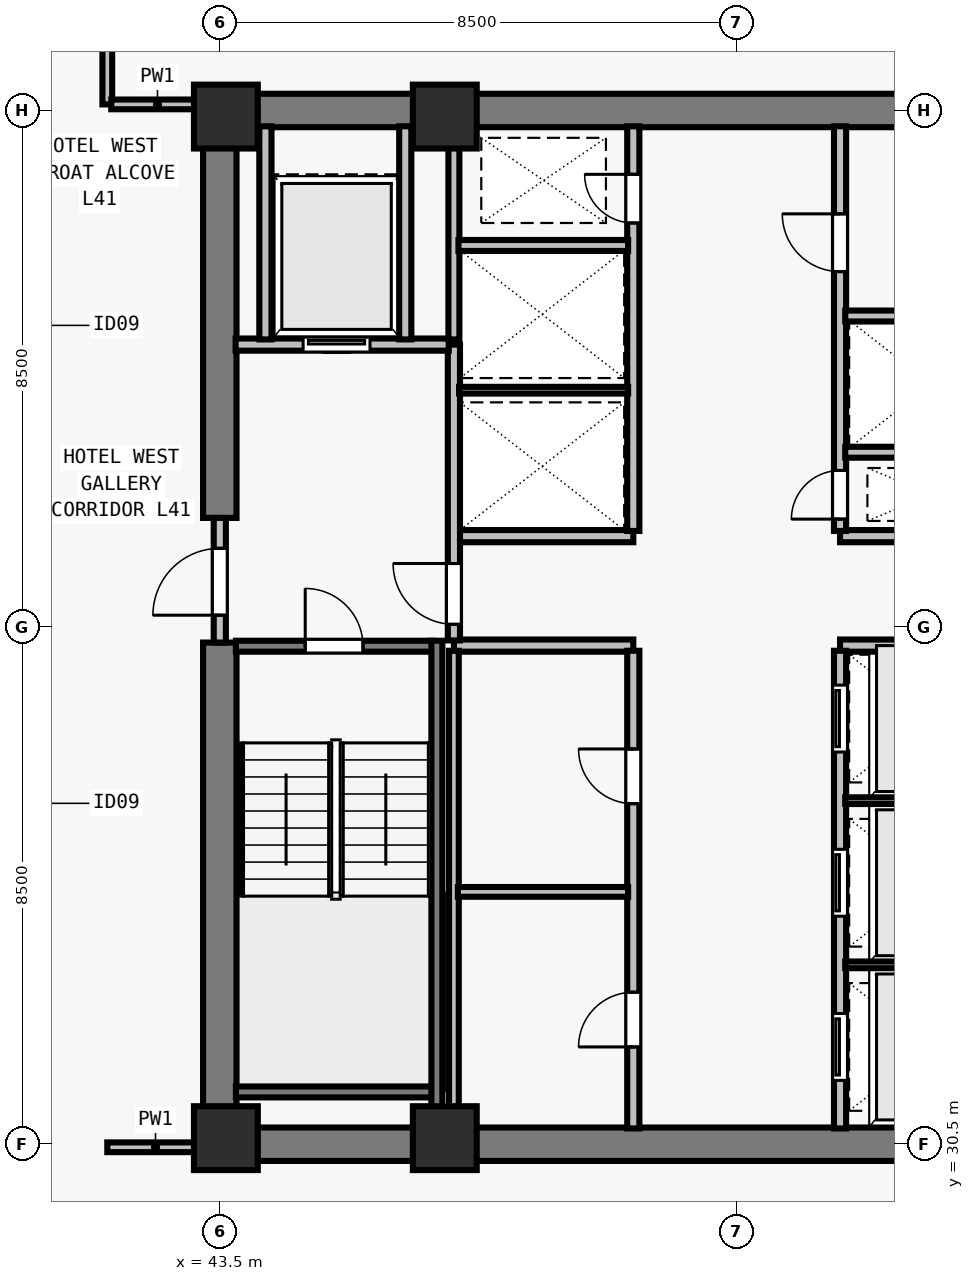
"""IFC4 building model, lengths in metres.
Left out: names, types, materials, properties, quantities, classifications, styles, units other than length and angle.
Written with IfcOpenShell. Run it as: python <this file> out.ifc"""

import sys

from ifc_helpers import new_model, si_unit, direction, frame, frame_2d, origin, origin_2d, place, context, subcontext, project, spatial, rectangle, extrude, element, fill, save


model = new_model("IFC4")
c1 = context("Model", 3, precision=1e-05, world=origin(), true_north=direction((0.0, 1.0)))
c2 = subcontext(c1, "Body", "Model", "MODEL_VIEW")
j1 = project(units=[si_unit("LENGTHUNIT", "METRE"), si_unit("PLANEANGLEUNIT", "RADIAN")], contexts=[c1])
p1 = place(None, origin())
s1 = spatial("IfcSite", under=j1, at=p1, CompositionType="ELEMENT")
p2 = place(p1, origin())
s2 = spatial("IfcBuilding", under=s1, at=p2, CompositionType="ELEMENT")
p3 = place(p2, frame((0.0, 0.0, 151.5)))
s3 = spatial("IfcBuildingStorey", under=s2, at=p3, CompositionType="ELEMENT", Elevation=151.5)
for number, where, z_axis, x_axis in (
    (1, (43.6, 30.6, 0.0), (0.0, 0.0, 1.0), (1.0, 0.0, 0.0)),
    (2, (47.2, 30.6, 0.0), (0.0, 0.0, 1.0), (1.0, 0.0, 0.0)),
    (3, (43.6, 47.4, 0.0), (0.0, 0.0, 1.0), (1.0, 0.0, 0.0)),
    (4, (47.2, 47.4, 0.0), (0.0, 0.0, 1.0), (1.0, 0.0, 0.0)),
):
    element("IfcColumn", number, at=place(p3, frame(where, z_axis=z_axis, x_axis=x_axis)), inside=s3, PredefinedType="COLUMN", context=c2, shape_type="SweptSolid", body=[
        extrude(rectangle(XDim=1.05, YDim=1.05, at=origin_2d()), origin(), (0.0, 0.0, 1.0), 3.5),
    ])
for number, where, z_axis, x_axis in (
    (5, (43.225, 30.5, 0.0), (0.0, 0.0, 1.0), (1.0, 0.0, 0.0)),
    (6, (43.225, 47.5, 0.0), (0.0, 0.0, 1.0), (1.0, 0.0, 0.0)),
):
    element("IfcWall", number, at=place(p3, frame(where, z_axis=z_axis, x_axis=x_axis)), inside=s3, PredefinedType="SHEAR", context=c2, shape_type="SweptSolid", body=[
        extrude(rectangle(XDim=17.55, YDim=0.55, at=frame_2d((8.775, 0.0))), origin(), (0.0, 0.0, 1.0), 3.28),
    ])
p4 = place(p3, frame((43.5, 30.765, 0.0), z_axis=(0.0, 0.0, 1.0), x_axis=(0.0, 1.0, 0.0)))
e7 = element("IfcWall", 7, at=p4, inside=s3, PredefinedType="SHEAR", context=c2, shape_type="SweptSolid", body=[
    extrude(rectangle(XDim=7.985, YDim=0.55, at=frame_2d((3.993, 0.0))), origin(), (0.0, 0.0, 1.0), 3.28),
])
p5 = place(p3, frame((43.5, 40.8, 0.0), z_axis=(0.0, 0.0, 1.0), x_axis=(0.0, 1.0, 0.0)))
e8 = element("IfcWall", 8, at=p5, inside=s3, PredefinedType="SHEAR", context=c2, shape_type="SweptSolid", body=[
    extrude(rectangle(XDim=6.435, YDim=0.55, at=frame_2d((3.218, 0.0))), origin(), (0.0, 0.0, 1.0), 3.28),
])
for number, where, z_axis, x_axis in (
    (9, (47.35, 38.7, 0.0), (0.0, 0.0, 1.0), (1.0, 0.0, 0.0)),
    (10, (47.35, 40.5, 0.0), (0.0, 0.0, 1.0), (1.0, 0.0, 0.0)),
    (11, (53.7, 38.7, 0.0), (0.0, 0.0, 1.0), (1.0, 0.0, 0.0)),
    (12, (53.7, 40.5, 0.0), (0.0, 0.0, 1.0), (1.0, 0.0, 0.0)),
):
    element("IfcWall", number, at=place(p3, frame(where, z_axis=z_axis, x_axis=x_axis)), inside=s3, PredefinedType="SOLIDWALL", context=c2, shape_type="SweptSolid", body=[
        extrude(rectangle(XDim=2.95, YDim=0.2, at=frame_2d((1.475, 0.0))), origin(), (0.0, 0.0, 1.0), 3.28),
    ])
p6 = place(p3, frame((50.3, 30.76, 0.0), z_axis=(0.0, 0.0, 1.0), x_axis=(0.0, 1.0, 0.0)))
e13 = element("IfcWall", 13, at=p6, inside=s3, PredefinedType="SOLIDWALL", context=c2, shape_type="SweptSolid", body=[
    extrude(rectangle(XDim=7.855, YDim=0.2, at=frame_2d((3.927, 0.0))), origin(), (0.0, 0.0, 1.0), 3.28),
])
p7 = place(p6, frame((1.34, 0.0, 0.0)))
e14 = element("IfcOpeningElement", 14, at=p7, cuts=e13, PredefinedType="OPENING", context=c2, shape_type="SweptSolid", body=[
    extrude(rectangle(XDim=0.9, YDim=2.12, at=frame_2d((0.45, 1.06))), frame((0.0, 0.11, 0.0), z_axis=(0.0, -1.0, 0.0), x_axis=(1.0, 0.0, 0.0)), (0.0, 0.0, 1.0), 0.22),
])
p8 = place(p6, frame((5.34, 0.0, 0.0)))
e15 = element("IfcOpeningElement", 15, at=p8, cuts=e13, PredefinedType="OPENING", context=c2, shape_type="SweptSolid", body=[
    extrude(rectangle(XDim=0.9, YDim=2.12, at=frame_2d((0.45, 1.06))), frame((0.0, 0.11, 0.0), z_axis=(0.0, -1.0, 0.0), x_axis=(1.0, 0.0, 0.0)), (0.0, 0.0, 1.0), 0.22),
])
p9 = place(p3, frame((53.7, 30.76, 0.0), z_axis=(0.0, 0.0, 1.0), x_axis=(0.0, 1.0, 0.0)))
e16 = element("IfcWall", 16, at=p9, inside=s3, PredefinedType="SOLIDWALL", context=c2, shape_type="SweptSolid", body=[
    extrude(rectangle(XDim=7.855, YDim=0.2, at=frame_2d((3.927, 0.0))), origin(), (0.0, 0.0, 1.0), 3.28),
])
p10 = place(p9, frame((0.79, 0.0, 0.0)))
e17 = element("IfcOpeningElement", 17, at=p10, cuts=e16, PredefinedType="OPENING", context=c2, shape_type="SweptSolid", body=[
    extrude(rectangle(XDim=1.1, YDim=2.2, at=frame_2d((0.55, 1.1))), frame((0.0, 0.11, 0.0), z_axis=(0.0, -1.0, 0.0), x_axis=(1.0, 0.0, 0.0)), (0.0, 0.0, 1.0), 0.22),
])
p11 = place(p9, frame((3.49, 0.0, 0.0)))
e18 = element("IfcOpeningElement", 18, at=p11, cuts=e16, PredefinedType="OPENING", context=c2, shape_type="SweptSolid", body=[
    extrude(rectangle(XDim=1.1, YDim=2.2, at=frame_2d((0.55, 1.1))), frame((0.0, 0.11, 0.0), z_axis=(0.0, -1.0, 0.0), x_axis=(1.0, 0.0, 0.0)), (0.0, 0.0, 1.0), 0.22),
])
p12 = place(p9, frame((6.19, 0.0, 0.0)))
e19 = element("IfcOpeningElement", 19, at=p12, cuts=e16, PredefinedType="OPENING", context=c2, shape_type="SweptSolid", body=[
    extrude(rectangle(XDim=1.1, YDim=2.2, at=frame_2d((0.55, 1.1))), frame((0.0, 0.11, 0.0), z_axis=(0.0, -1.0, 0.0), x_axis=(1.0, 0.0, 0.0)), (0.0, 0.0, 1.0), 0.22),
])
p13 = place(p3, frame((50.3, 40.585, 0.0), z_axis=(0.0, 0.0, 1.0), x_axis=(0.0, 1.0, 0.0)))
e20 = element("IfcWall", 20, at=p13, inside=s3, PredefinedType="SOLIDWALL", context=c2, shape_type="SweptSolid", body=[
    extrude(rectangle(XDim=6.655, YDim=0.2, at=frame_2d((3.328, 0.0))), origin(), (0.0, 0.0, 1.0), 3.28),
])
p14 = place(p13, frame((5.065, 0.0, 0.0)))
e21 = element("IfcOpeningElement", 21, at=p14, cuts=e20, PredefinedType="OPENING", context=c2, shape_type="SweptSolid", body=[
    extrude(rectangle(XDim=0.8, YDim=2.08, at=frame_2d((0.4, 1.04))), frame((0.0, 0.11, 0.0), z_axis=(0.0, -1.0, 0.0), x_axis=(1.0, 0.0, 0.0)), (0.0, 0.0, 1.0), 0.22),
])
p15 = place(p3, frame((53.7, 40.585, 0.0), z_axis=(0.0, 0.0, 1.0), x_axis=(0.0, 1.0, 0.0)))
e22 = element("IfcWall", 22, at=p15, inside=s3, PredefinedType="SOLIDWALL", context=c2, shape_type="SweptSolid", body=[
    extrude(rectangle(XDim=6.655, YDim=0.2, at=frame_2d((3.328, 0.0))), origin(), (0.0, 0.0, 1.0), 3.28),
])
p16 = place(p15, frame((0.195, 0.0, 0.0)))
e23 = element("IfcOpeningElement", 23, at=p16, cuts=e22, PredefinedType="OPENING", context=c2, shape_type="SweptSolid", body=[
    extrude(rectangle(XDim=0.8, YDim=2.08, at=frame_2d((0.4, 1.04))), frame((0.0, 0.11, 0.0), z_axis=(0.0, -1.0, 0.0), x_axis=(1.0, 0.0, 0.0)), (0.0, 0.0, 1.0), 0.22),
])
p17 = place(p15, frame((4.265, 0.0, 0.0)))
e24 = element("IfcOpeningElement", 24, at=p17, cuts=e22, PredefinedType="OPENING", context=c2, shape_type="SweptSolid", body=[
    extrude(rectangle(XDim=0.95, YDim=2.12, at=frame_2d((0.475, 1.06))), frame((0.0, 0.11, 0.0), z_axis=(0.0, -1.0, 0.0), x_axis=(1.0, 0.0, 0.0)), (0.0, 0.0, 1.0), 0.22),
])
p18 = place(p3, frame((43.5, 38.75, 0.0), z_axis=(0.0, 0.0, 1.0), x_axis=(0.0, 1.0, 0.0)))
e25 = element("IfcWall", 25, at=p18, inside=s3, PredefinedType="SOLIDWALL", context=c2, shape_type="SweptSolid", body=[
    extrude(rectangle(XDim=2.05, YDim=0.2, at=frame_2d((1.025, 0.0))), origin(), (0.0, 0.0, 1.0), 3.28),
])
p19 = place(p18, frame((0.45, 0.0, 0.0)))
e26 = element("IfcOpeningElement", 26, at=p19, cuts=e25, PredefinedType="OPENING", context=c2, shape_type="SweptSolid", body=[
    extrude(rectangle(XDim=1.1, YDim=2.15, at=frame_2d((0.55, 1.075))), frame((0.0, 0.11, 0.0), z_axis=(0.0, -1.0, 0.0), x_axis=(1.0, 0.0, 0.0)), (0.0, 0.0, 1.0), 0.22),
])
p20 = place(p3, frame((47.35, 38.785, 0.0), z_axis=(0.0, 0.0, 1.0), x_axis=(0.0, 1.0, 0.0)))
e27 = element("IfcWall", 27, at=p20, inside=s3, PredefinedType="SOLIDWALL", context=c2, shape_type="SweptSolid", body=[
    extrude(rectangle(XDim=4.865, YDim=0.2, at=frame_2d((2.433, 0.0))), origin(), (0.0, 0.0, 1.0), 3.28),
])
p21 = place(p20, frame((0.265, 0.0, 0.0)))
e28 = element("IfcOpeningElement", 28, at=p21, cuts=e27, PredefinedType="OPENING", context=c2, shape_type="SweptSolid", body=[
    extrude(rectangle(XDim=1.0, YDim=2.15, at=frame_2d((0.5, 1.075))), frame((0.0, 0.11, 0.0), z_axis=(0.0, -1.0, 0.0), x_axis=(1.0, 0.0, 0.0)), (0.0, 0.0, 1.0), 0.22),
])
p22 = place(p3, frame((43.76, 43.65, 0.0), z_axis=(0.0, 0.0, 1.0), x_axis=(1.0, 0.0, 0.0)))
e29 = element("IfcWall", 29, at=p22, inside=s3, PredefinedType="SOLIDWALL", context=c2, shape_type="SweptSolid", body=[
    extrude(rectangle(XDim=3.505, YDim=0.2, at=frame_2d((1.752, 0.0))), origin(), (0.0, 0.0, 1.0), 3.28),
])
p23 = place(p22, frame((1.11, 0.0, 0.0)))
e30 = element("IfcOpeningElement", 30, at=p23, cuts=e29, PredefinedType="OPENING", context=c2, shape_type="SweptSolid", body=[
    extrude(rectangle(XDim=1.1, YDim=2.2, at=frame_2d((0.55, 1.1))), frame((0.0, 0.11, 0.0), z_axis=(0.0, -1.0, 0.0), x_axis=(1.0, 0.0, 0.0)), (0.0, 0.0, 1.0), 0.22),
])
for number, where, z_axis, x_axis in (
    (31, (46.55, 43.735, 0.0), (0.0, 0.0, 1.0), (0.0, 1.0, 0.0)),
    (32, (44.25, 43.735, 0.0), (0.0, 0.0, 1.0), (0.0, 1.0, 0.0)),
):
    element("IfcWall", number, at=place(p3, frame(where, z_axis=z_axis, x_axis=x_axis)), inside=s3, PredefinedType="SOLIDWALL", context=c2, shape_type="SweptSolid", body=[
        extrude(rectangle(XDim=3.505, YDim=0.2, at=frame_2d((1.752, 0.0))), origin(), (0.0, 0.0, 1.0), 3.28),
    ])
p24 = place(p3, frame((47.35, 30.76, 0.0), z_axis=(0.0, 0.0, 1.0), x_axis=(0.0, 1.0, 0.0)))
e33 = element("IfcWall", 33, at=p24, inside=s3, PredefinedType="PARTITIONING", context=c2, shape_type="SweptSolid", body=[
    extrude(rectangle(XDim=7.855, YDim=0.16, at=frame_2d((3.927, 0.0))), origin(), (0.0, 0.0, 1.0), 3.28),
])
p25 = place(p3, frame((47.415, 34.65, 0.0), z_axis=(0.0, 0.0, 1.0), x_axis=(1.0, 0.0, 0.0)))
e34 = element("IfcWall", 34, at=p25, inside=s3, PredefinedType="PARTITIONING", context=c2, shape_type="SweptSolid", body=[
    extrude(rectangle(XDim=2.8, YDim=0.16, at=frame_2d((1.4, 0.0))), origin(), (0.0, 0.0, 1.0), 3.28),
])
for number, where, z_axis, x_axis in (
    (35, (53.785, 33.45, 0.0), (0.0, 0.0, 1.0), (1.0, 0.0, 0.0)),
    (36, (53.785, 36.15, 0.0), (0.0, 0.0, 1.0), (1.0, 0.0, 0.0)),
):
    element("IfcWall", number, at=place(p3, frame(where, z_axis=z_axis, x_axis=x_axis)), inside=s3, PredefinedType="PARTITIONING", context=c2, shape_type="SweptSolid", body=[
        extrude(rectangle(XDim=2.79, YDim=0.11, at=frame_2d((1.395, 0.0))), origin(), (0.0, 0.0, 1.0), 3.28),
    ])
p26 = place(p3, frame((47.35, 43.735, 0.0), z_axis=(0.0, 0.0, 1.0), x_axis=(0.0, 1.0, 0.0)))
e37 = element("IfcWall", 37, at=p26, inside=s3, PredefinedType="SOLIDWALL", context=c2, shape_type="SweptSolid", body=[
    extrude(rectangle(XDim=3.505, YDim=0.18, at=frame_2d((1.752, 0.0))), origin(), (0.0, 0.0, 1.0), 3.28),
])
p27 = place(p3, frame((47.435, 42.9, 0.0), z_axis=(0.0, 0.0, 1.0), x_axis=(1.0, 0.0, 0.0)))
e38 = element("IfcWall", 38, at=p27, inside=s3, PredefinedType="PARTITIONING", context=c2, shape_type="SweptSolid", body=[
    extrude(rectangle(XDim=2.78, YDim=0.11, at=frame_2d((1.39, 0.0))), origin(), (0.0, 0.0, 1.0), 3.28),
])
p28 = place(p3, frame((47.425, 45.28, 0.0), z_axis=(0.0, 0.0, 1.0), x_axis=(1.0, 0.0, 0.0)))
e39 = element("IfcWall", 39, at=p28, inside=s3, PredefinedType="SOLIDWALL", context=c2, shape_type="SweptSolid", body=[
    extrude(rectangle(XDim=2.79, YDim=0.18, at=frame_2d((1.395, 0.0))), origin(), (0.0, 0.0, 1.0), 3.28),
])
p29 = place(p3, frame((53.785, 41.88, 0.0), z_axis=(0.0, 0.0, 1.0), x_axis=(1.0, 0.0, 0.0)))
e40 = element("IfcWall", 40, at=p29, inside=s3, PredefinedType="SOLIDWALL", context=c2, shape_type="SweptSolid", body=[
    extrude(rectangle(XDim=2.78, YDim=0.18, at=frame_2d((1.39, 0.0))), origin(), (0.0, 0.0, 1.0), 3.28),
])
p30 = place(p3, frame((53.785, 44.12, 0.0), z_axis=(0.0, 0.0, 1.0), x_axis=(1.0, 0.0, 0.0)))
e41 = element("IfcWall", 41, at=p30, inside=s3, PredefinedType="SOLIDWALL", context=c2, shape_type="SweptSolid", body=[
    extrude(rectangle(XDim=2.79, YDim=0.18, at=frame_2d((1.395, 0.0))), origin(), (0.0, 0.0, 1.0), 3.28),
])
p31 = place(p3, frame((41.65, 47.6, 0.0), z_axis=(0.0, 0.0, 1.0), x_axis=(0.0, 1.0, 0.0)))
e42 = element("IfcWall", 42, at=p31, inside=s3, PredefinedType="PARTITIONING", context=c2, shape_type="SweptSolid", body=[
    extrude(rectangle(XDim=15.075, YDim=0.16, at=frame_2d((7.538, 0.0))), origin(), (0.0, 0.0, 1.0), 2.555),
])
p32 = place(p31, frame((1.8, 0.0, 0.0)))
e43 = element("IfcOpeningElement", 43, at=p32, cuts=e42, PredefinedType="OPENING", context=c2, shape_type="SweptSolid", body=[
    extrude(rectangle(XDim=0.96, YDim=2.12, at=frame_2d((0.48, 1.06))), frame((0.0, 0.09, 0.0), z_axis=(0.0, -1.0, 0.0), x_axis=(1.0, 0.0, 0.0)), (0.0, 0.0, 1.0), 0.18),
])
p33 = place(p3, frame((41.65, 30.45, 0.0), z_axis=(0.0, 0.0, 1.0), x_axis=(1.0, 0.0, 0.0)))
e44 = element("IfcWall", 44, at=p33, inside=s3, PredefinedType="PARTITIONING", context=c2, shape_type="SweptSolid", body=[
    extrude(rectangle(XDim=1.585, YDim=0.16, at=frame_2d((0.792, 0.0))), origin(), (0.0, 0.0, 1.0), 3.28),
])
p34 = place(p3, frame((41.715, 47.6, 0.0), z_axis=(0.0, 0.0, 1.0), x_axis=(1.0, 0.0, 0.0)))
e45 = element("IfcWall", 45, at=p34, inside=s3, PredefinedType="PARTITIONING", context=c2, shape_type="SweptSolid", body=[
    extrude(rectangle(XDim=1.52, YDim=0.16, at=frame_2d((0.76, 0.0))), origin(), (0.0, 0.0, 1.0), 3.28),
])
p35 = place(p3, frame((43.765, 38.69, 0.0), z_axis=(0.0, 0.0, 1.0), x_axis=(1.0, 0.0, 0.0)))
e46 = element("IfcWall", 46, at=p35, inside=s3, PredefinedType="SOLIDWALL", context=c2, shape_type="SweptSolid", body=[
    extrude(rectangle(XDim=3.23, YDim=0.18, at=frame_2d((1.615, 0.0))), origin(), (0.0, 0.0, 1.0), 3.28),
])
p36 = place(p35, frame((1.14, 0.0, 0.0)))
e47 = element("IfcOpeningElement", 47, at=p36, cuts=e46, PredefinedType="OPENING", context=c2, shape_type="SweptSolid", body=[
    extrude(rectangle(XDim=0.95, YDim=2.15, at=frame_2d((0.475, 1.075))), frame((0.0, 0.1, 0.0), z_axis=(0.0, -1.0, 0.0), x_axis=(1.0, 0.0, 0.0)), (0.0, 0.0, 1.0), 0.2),
])
p37 = place(p3, frame((43.765, 31.36, 0.0), z_axis=(0.0, 0.0, 1.0), x_axis=(1.0, 0.0, 0.0)))
e48 = element("IfcWall", 48, at=p37, inside=s3, PredefinedType="SOLIDWALL", context=c2, shape_type="SweptSolid", body=[
    extrude(rectangle(XDim=3.23, YDim=0.18, at=frame_2d((1.615, 0.0))), origin(), (0.0, 0.0, 1.0), 3.28),
])
p38 = place(p3, frame((47.07, 38.78, 0.0), z_axis=(0.0, 0.0, 1.0), x_axis=(0.0, -1.0, 0.0)))
e49 = element("IfcWall", 49, at=p38, inside=s3, PredefinedType="SOLIDWALL", context=c2, shape_type="SweptSolid", body=[
    extrude(rectangle(XDim=8.017, YDim=0.18, at=frame_2d((4.009, 0.0))), origin(), (0.0, 0.0, 1.0), 3.28),
])
p39 = place(p19, origin())
e50 = element("IfcDoor", 50, at=p39, inside=s3, OperationType="SINGLE_SWING_LEFT", PredefinedType="DOOR", context=c2, shape_type="SweptSolid", body=[
    extrude(rectangle(XDim=1.1, YDim=2.15, at=frame_2d((0.55, 1.075))), frame((0.0, 0.025, 0.0), z_axis=(0.0, -1.0, 0.0), x_axis=(1.0, 0.0, 0.0)), (0.0, 0.0, 1.0), 0.05),
])
fill(e26, e50)
p40 = place(p21, origin())
e51 = element("IfcDoor", 51, at=p40, inside=s3, OperationType="SINGLE_SWING_RIGHT", PredefinedType="DOOR", context=c2, shape_type="SweptSolid", body=[
    extrude(rectangle(XDim=1.0, YDim=2.15, at=frame_2d((0.5, 1.075))), frame((0.0, 0.025, 0.0), z_axis=(0.0, -1.0, 0.0), x_axis=(1.0, 0.0, 0.0)), (0.0, 0.0, 1.0), 0.05),
])
fill(e28, e51)
p41 = place(p23, origin())
e52 = element("IfcDoor", 52, at=p41, inside=s3, OperationType="SLIDING_TO_LEFT", PredefinedType="DOOR", context=c2, shape_type="SweptSolid", body=[
    extrude(rectangle(XDim=1.1, YDim=2.2, at=frame_2d((0.55, 1.1))), frame((0.0, 0.025, 0.0), z_axis=(0.0, -1.0, 0.0), x_axis=(1.0, 0.0, 0.0)), (0.0, 0.0, 1.0), 0.05),
])
fill(e30, e52)
p42 = place(p7, origin())
e53 = element("IfcDoor", 53, at=p42, inside=s3, OperationType="SINGLE_SWING_LEFT", PredefinedType="DOOR", context=c2, shape_type="SweptSolid", body=[
    extrude(rectangle(XDim=0.9, YDim=2.12, at=frame_2d((0.45, 1.06))), frame((0.0, 0.025, 0.0), z_axis=(0.0, -1.0, 0.0), x_axis=(1.0, 0.0, 0.0)), (0.0, 0.0, 1.0), 0.05),
])
fill(e14, e53)
p43 = place(p8, origin())
e54 = element("IfcDoor", 54, at=p43, inside=s3, OperationType="SINGLE_SWING_RIGHT", PredefinedType="DOOR", context=c2, shape_type="SweptSolid", body=[
    extrude(rectangle(XDim=0.9, YDim=2.12, at=frame_2d((0.45, 1.06))), frame((0.0, 0.025, 0.0), z_axis=(0.0, -1.0, 0.0), x_axis=(1.0, 0.0, 0.0)), (0.0, 0.0, 1.0), 0.05),
])
fill(e15, e54)
p44 = place(p10, origin())
e55 = element("IfcDoor", 55, at=p44, inside=s3, OperationType="SLIDING_TO_LEFT", PredefinedType="DOOR", context=c2, shape_type="SweptSolid", body=[
    extrude(rectangle(XDim=1.1, YDim=2.2, at=frame_2d((0.55, 1.1))), frame((0.0, 0.025, 0.0), z_axis=(0.0, -1.0, 0.0), x_axis=(1.0, 0.0, 0.0)), (0.0, 0.0, 1.0), 0.05),
])
fill(e17, e55)
p45 = place(p11, origin())
e56 = element("IfcDoor", 56, at=p45, inside=s3, OperationType="SLIDING_TO_LEFT", PredefinedType="DOOR", context=c2, shape_type="SweptSolid", body=[
    extrude(rectangle(XDim=1.1, YDim=2.2, at=frame_2d((0.55, 1.1))), frame((0.0, 0.025, 0.0), z_axis=(0.0, -1.0, 0.0), x_axis=(1.0, 0.0, 0.0)), (0.0, 0.0, 1.0), 0.05),
])
fill(e18, e56)
p46 = place(p12, origin())
e57 = element("IfcDoor", 57, at=p46, inside=s3, OperationType="SLIDING_TO_LEFT", PredefinedType="DOOR", context=c2, shape_type="SweptSolid", body=[
    extrude(rectangle(XDim=1.1, YDim=2.2, at=frame_2d((0.55, 1.1))), frame((0.0, 0.025, 0.0), z_axis=(0.0, -1.0, 0.0), x_axis=(1.0, 0.0, 0.0)), (0.0, 0.0, 1.0), 0.05),
])
fill(e19, e57)
p47 = place(p14, origin())
e58 = element("IfcDoor", 58, at=p47, inside=s3, OperationType="SINGLE_SWING_RIGHT", PredefinedType="DOOR", context=c2, shape_type="SweptSolid", body=[
    extrude(rectangle(XDim=0.8, YDim=2.08, at=frame_2d((0.4, 1.04))), frame((0.0, 0.025, 0.0), z_axis=(0.0, -1.0, 0.0), x_axis=(1.0, 0.0, 0.0)), (0.0, 0.0, 1.0), 0.05),
])
fill(e21, e58)
p48 = place(p16, origin())
e59 = element("IfcDoor", 59, at=p48, inside=s3, OperationType="SINGLE_SWING_LEFT", PredefinedType="DOOR", context=c2, shape_type="SweptSolid", body=[
    extrude(rectangle(XDim=0.8, YDim=2.08, at=frame_2d((0.4, 1.04))), frame((0.0, 0.025, 0.0), z_axis=(0.0, -1.0, 0.0), x_axis=(1.0, 0.0, 0.0)), (0.0, 0.0, 1.0), 0.05),
])
fill(e23, e59)
p49 = place(p17, origin())
e60 = element("IfcDoor", 60, at=p49, inside=s3, OperationType="SINGLE_SWING_RIGHT", PredefinedType="DOOR", context=c2, shape_type="SweptSolid", body=[
    extrude(rectangle(XDim=0.95, YDim=2.12, at=frame_2d((0.475, 1.06))), frame((0.0, 0.025, 0.0), z_axis=(0.0, -1.0, 0.0), x_axis=(1.0, 0.0, 0.0)), (0.0, 0.0, 1.0), 0.05),
])
fill(e24, e60)
p50 = place(p36, origin())
e61 = element("IfcDoor", 61, at=p50, inside=s3, OperationType="SINGLE_SWING_LEFT", PredefinedType="DOOR", context=c2, shape_type="SweptSolid", body=[
    extrude(rectangle(XDim=0.95, YDim=2.15, at=frame_2d((0.475, 1.075))), frame((0.0, 0.025, 0.0), z_axis=(0.0, -1.0, 0.0), x_axis=(1.0, 0.0, 0.0)), (0.0, 0.0, 1.0), 0.05),
])
fill(e47, e61)
save(model, sys.argv[1])
